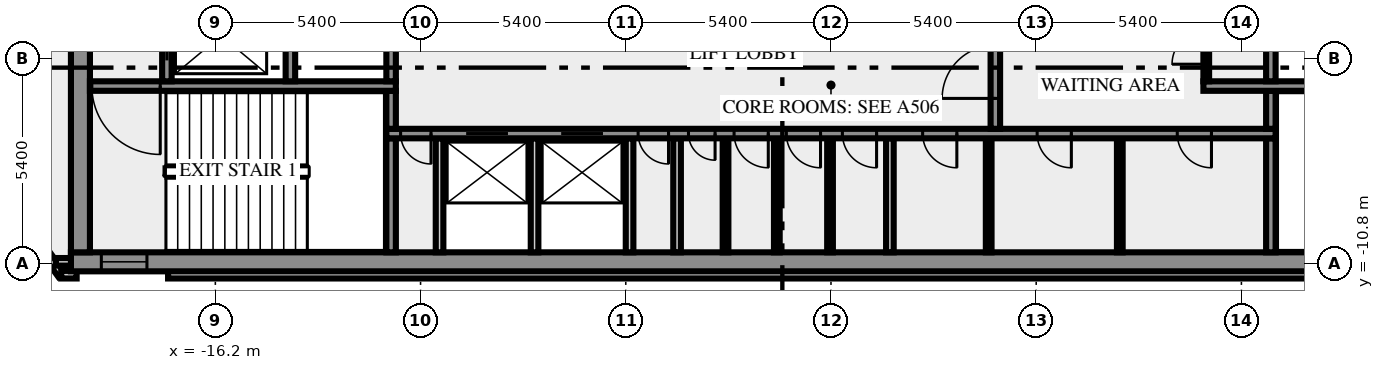
"""IFC4 building model, lengths in metres.
Left out: names, types, materials, properties, quantities, classifications, styles, units other than length and angle.
Written with IfcOpenShell. Run it as: python <this file> out.ifc"""

import sys

from ifc_helpers import new_model, si_unit, direction, frame, frame_2d, origin, place, context, subcontext, project, spatial, rectangle, extrude, element, fill, save


model = new_model("IFC4")
c1 = context("Model", 3, precision=1e-05, world=origin(), true_north=direction((0.0, 1.0)))
c2 = subcontext(c1, "Body", "Model", "MODEL_VIEW")
j1 = project(units=[si_unit("LENGTHUNIT", "METRE"), si_unit("PLANEANGLEUNIT", "RADIAN")], contexts=[c1])
p1 = place(None, origin())
s1 = spatial("IfcSite", under=j1, at=p1, CompositionType="ELEMENT")
p2 = place(p1, origin())
s2 = spatial("IfcBuilding", under=s1, at=p2, CompositionType="ELEMENT")
p3 = place(p2, frame((0.0, 0.0, 257.0)))
s3 = spatial("IfcBuildingStorey", under=s2, at=p3, CompositionType="ELEMENT", Elevation=257.0)
p4 = place(p3, frame((-21.833, -8.909, 0.0), z_axis=(0.0, 0.0, 1.0), x_axis=(0.587766567315, -0.809030569476, 0.0)))
e1 = element("IfcWall", 1, at=p4, inside=s3, PredefinedType="SOLIDWALL", context=c2, shape_type="SweptSolid", body=[
    extrude(rectangle(XDim=2.688, YDim=0.2, at=frame_2d((1.344, 0.0))), origin(), (0.0, 0.0, 1.0), 3.65),
])
p5 = place(p3, frame((-20.256, -11.088, 0.0), z_axis=(0.0, 0.0, 1.0), x_axis=(1.0, 0.0, 0.0)))
e2 = element("IfcWall", 2, at=p5, inside=s3, PredefinedType="SOLIDWALL", context=c2, shape_type="SweptSolid", body=[
    extrude(rectangle(XDim=0.406, YDim=0.2, at=frame_2d((0.203, 0.0))), origin(), (0.0, 0.0, 1.0), 3.65),
])
p6 = place(p3, frame((-17.444, -11.088, 0.0), z_axis=(0.0, 0.0, 1.0), x_axis=(1.0, 0.0, 0.0)))
e3 = element("IfcWall", 3, at=p6, inside=s3, PredefinedType="SOLIDWALL", context=c2, shape_type="SweptSolid", body=[
    extrude(rectangle(XDim=34.888, YDim=0.2, at=frame_2d((17.444, 0.0))), origin(), (0.0, 0.0, 1.0), 3.65),
])
p7 = place(p3, frame((-19.98, -10.75, 0.0), z_axis=(0.0, 0.0, 1.0), x_axis=(-1.0, 0.0, 0.0)))
e4 = element("IfcWall", 4, at=p7, inside=s3, PredefinedType="SOLIDWALL", context=c2, shape_type="SweptSolid", body=[
    extrude(rectangle(XDim=0.417, YDim=0.2, at=frame_2d((0.208, 0.0))), origin(), (0.0, 0.0, 1.0), 3.65),
])
p8 = place(p3, frame((-20.0, -10.75, 0.0), z_axis=(0.0, 0.0, 1.0), x_axis=(1.0, 0.0, 0.0)))
e5 = element("IfcWall", 5, at=p8, inside=s3, PredefinedType="SHEAR", context=c2, shape_type="SweptSolid", body=[
    extrude(rectangle(XDim=40.0, YDim=0.5, at=frame_2d((20.0, 0.0))), origin(), (0.0, 0.0, 1.0), 3.65),
])
p9 = place(p8, frame((0.8, 0.0, 1.0)))
e6 = element("IfcOpeningElement", 6, at=p9, cuts=e5, PredefinedType="OPENING", context=c2, shape_type="SweptSolid", body=[
    extrude(rectangle(XDim=1.2, YDim=1.2, at=frame_2d((0.6, 0.6))), frame((0.0, 0.26, 0.0), z_axis=(0.0, -1.0, 0.0), x_axis=(1.0, 0.0, 0.0)), (0.0, 0.0, 1.0), 0.52),
])
p10 = place(p8, frame((38.0, 0.0, 1.0)))
e7 = element("IfcOpeningElement", 7, at=p10, cuts=e5, PredefinedType="OPENING", context=c2, shape_type="SweptSolid", body=[
    extrude(rectangle(XDim=1.2, YDim=1.2, at=frame_2d((0.6, 0.6))), frame((0.0, 0.26, 0.0), z_axis=(0.0, -1.0, 0.0), x_axis=(1.0, 0.0, 0.0)), (0.0, 0.0, 1.0), 0.52),
])
p11 = place(p3, frame((-19.75, -10.5, 0.0), z_axis=(0.0, 0.0, 1.0), x_axis=(0.0, 1.0, 0.0)))
e8 = element("IfcWall", 8, at=p11, inside=s3, PredefinedType="SHEAR", context=c2, shape_type="SweptSolid", body=[
    extrude(rectangle(XDim=8.8, YDim=0.5, at=frame_2d((4.4, 0.0))), origin(), (0.0, 0.0, 1.0), 3.65),
])
p12 = place(p3, frame((-11.575, -10.5, 0.0), z_axis=(0.0, 0.0, 1.0), x_axis=(0.0, 1.0, 0.0)))
e9 = element("IfcWall", 9, at=p12, inside=s3, PredefinedType="SHEAR", context=c2, shape_type="SweptSolid", body=[
    extrude(rectangle(XDim=3.0, YDim=0.25, at=frame_2d((1.5, 0.0))), origin(), (0.0, 0.0, 1.0), 3.65),
])
for number, where, z_axis, x_axis in (
    (10, (-10.3, -10.5, 0.0), (0.0, 0.0, 1.0), (0.0, 1.0, 0.0)),
    (11, (-7.8, -10.5, 0.0), (0.0, 0.0, 1.0), (0.0, 1.0, 0.0)),
    (12, (-5.3, -10.5, 0.0), (0.0, 0.0, 1.0), (0.0, 1.0, 0.0)),
    (13, (-4.05, -10.5, 0.0), (0.0, 0.0, 1.0), (0.0, 1.0, 0.0)),
):
    element("IfcWall", number, at=place(p3, frame(where, z_axis=z_axis, x_axis=x_axis)), inside=s3, PredefinedType="SOLIDWALL", context=c2, shape_type="SweptSolid", body=[
        extrude(rectangle(XDim=3.0, YDim=0.2, at=frame_2d((1.5, 0.0))), origin(), (0.0, 0.0, 1.0), 3.65),
    ])
for number, where, z_axis, x_axis in (
    (14, (-2.775, -10.5, 0.0), (0.0, 0.0, 1.0), (0.0, 1.0, 0.0)),
    (15, (-1.425, -10.5, 0.0), (0.0, 0.0, 1.0), (0.0, 1.0, 0.0)),
    (16, (-0.025, -10.5, 0.0), (0.0, 0.0, 1.0), (0.0, 1.0, 0.0)),
):
    element("IfcWall", number, at=place(p3, frame(where, z_axis=z_axis, x_axis=x_axis)), inside=s3, PredefinedType="PARTITIONING", context=c2, shape_type="SweptSolid", body=[
        extrude(rectangle(XDim=3.0, YDim=0.15, at=frame_2d((1.5, 0.0))), origin(), (0.0, 0.0, 1.0), 3.65),
    ])
p13 = place(p3, frame((1.55, -10.5, 0.0), z_axis=(0.0, 0.0, 1.0), x_axis=(0.0, 1.0, 0.0)))
e17 = element("IfcWall", 17, at=p13, inside=s3, PredefinedType="SOLIDWALL", context=c2, shape_type="SweptSolid", body=[
    extrude(rectangle(XDim=3.0, YDim=0.2, at=frame_2d((1.5, 0.0))), origin(), (0.0, 0.0, 1.0), 3.65),
])
for number, where, z_axis, x_axis in (
    (18, (4.15, -10.5, 0.0), (0.0, 0.0, 1.0), (0.0, 1.0, 0.0)),
    (19, (7.6, -10.5, 0.0), (0.0, 0.0, 1.0), (0.0, 1.0, 0.0)),
):
    element("IfcWall", number, at=place(p3, frame(where, z_axis=z_axis, x_axis=x_axis)), inside=s3, PredefinedType="PARTITIONING", context=c2, shape_type="SweptSolid", body=[
        extrude(rectangle(XDim=3.0, YDim=0.15, at=frame_2d((1.5, 0.0))), origin(), (0.0, 0.0, 1.0), 3.65),
    ])
p14 = place(p3, frame((11.575, -10.5, 0.0), z_axis=(0.0, 0.0, 1.0), x_axis=(0.0, 1.0, 0.0)))
e20 = element("IfcWall", 20, at=p14, inside=s3, PredefinedType="SHEAR", context=c2, shape_type="SweptSolid", body=[
    extrude(rectangle(XDim=3.0, YDim=0.25, at=frame_2d((1.5, 0.0))), origin(), (0.0, 0.0, 1.0), 3.65),
])
p15 = place(p3, frame((11.7, -7.375, 0.0), z_axis=(0.0, 0.0, 1.0), x_axis=(-1.0, 0.0, 0.0)))
e21 = element("IfcWall", 21, at=p15, inside=s3, PredefinedType="SHEAR", context=c2, shape_type="SweptSolid", body=[
    extrude(rectangle(XDim=23.4, YDim=0.25, at=frame_2d((11.7, 0.0))), origin(), (0.0, 0.0, 1.0), 3.65),
])
p16 = place(p15, frame((22.225, 0.0, 0.0)))
e22 = element("IfcOpeningElement", 22, at=p16, cuts=e21, PredefinedType="OPENING", context=c2, shape_type="SweptSolid", body=[
    extrude(rectangle(XDim=0.8, YDim=2.1, at=frame_2d((0.4, 1.05))), frame((0.0, 0.135, 0.0), z_axis=(0.0, -1.0, 0.0), x_axis=(1.0, 0.0, 0.0)), (0.0, 0.0, 1.0), 0.27),
])
p17 = place(p15, frame((20.2, 0.0, 0.0)))
e23 = element("IfcOpeningElement", 23, at=p17, cuts=e21, PredefinedType="OPENING", context=c2, shape_type="SweptSolid", body=[
    extrude(rectangle(XDim=1.1, YDim=2.1, at=frame_2d((0.55, 1.05))), frame((0.0, 0.135, 0.0), z_axis=(0.0, -1.0, 0.0), x_axis=(1.0, 0.0, 0.0)), (0.0, 0.0, 1.0), 0.27),
])
p18 = place(p15, frame((17.7, 0.0, 0.0)))
e24 = element("IfcOpeningElement", 24, at=p18, cuts=e21, PredefinedType="OPENING", context=c2, shape_type="SweptSolid", body=[
    extrude(rectangle(XDim=1.1, YDim=2.1, at=frame_2d((0.55, 1.05))), frame((0.0, 0.135, 0.0), z_axis=(0.0, -1.0, 0.0), x_axis=(1.0, 0.0, 0.0)), (0.0, 0.0, 1.0), 0.27),
])
p19 = place(p15, frame((15.975, 0.0, 0.0)))
e25 = element("IfcOpeningElement", 25, at=p19, cuts=e21, PredefinedType="OPENING", context=c2, shape_type="SweptSolid", body=[
    extrude(rectangle(XDim=0.8, YDim=2.1, at=frame_2d((0.4, 1.05))), frame((0.0, 0.135, 0.0), z_axis=(0.0, -1.0, 0.0), x_axis=(1.0, 0.0, 0.0)), (0.0, 0.0, 1.0), 0.27),
])
p20 = place(p15, frame((14.75, 0.0, 0.0)))
e26 = element("IfcOpeningElement", 26, at=p20, cuts=e21, PredefinedType="OPENING", context=c2, shape_type="SweptSolid", body=[
    extrude(rectangle(XDim=0.7, YDim=2.1, at=frame_2d((0.35, 1.05))), frame((0.0, 0.135, 0.0), z_axis=(0.0, -1.0, 0.0), x_axis=(1.0, 0.0, 0.0)), (0.0, 0.0, 1.0), 0.27),
])
p21 = place(p15, frame((13.35, 0.0, 0.0)))
e27 = element("IfcOpeningElement", 27, at=p21, cuts=e21, PredefinedType="OPENING", context=c2, shape_type="SweptSolid", body=[
    extrude(rectangle(XDim=0.9, YDim=2.1, at=frame_2d((0.45, 1.05))), frame((0.0, 0.135, 0.0), z_axis=(0.0, -1.0, 0.0), x_axis=(1.0, 0.0, 0.0)), (0.0, 0.0, 1.0), 0.27),
])
p22 = place(p15, frame((11.975, 0.0, 0.0)))
e28 = element("IfcOpeningElement", 28, at=p22, cuts=e21, PredefinedType="OPENING", context=c2, shape_type="SweptSolid", body=[
    extrude(rectangle(XDim=0.9, YDim=2.1, at=frame_2d((0.45, 1.05))), frame((0.0, 0.135, 0.0), z_axis=(0.0, -1.0, 0.0), x_axis=(1.0, 0.0, 0.0)), (0.0, 0.0, 1.0), 0.27),
])
p23 = place(p15, frame((10.5, 0.0, 0.0)))
e29 = element("IfcOpeningElement", 29, at=p23, cuts=e21, PredefinedType="OPENING", context=c2, shape_type="SweptSolid", body=[
    extrude(rectangle(XDim=0.9, YDim=2.1, at=frame_2d((0.45, 1.05))), frame((0.0, 0.135, 0.0), z_axis=(0.0, -1.0, 0.0), x_axis=(1.0, 0.0, 0.0)), (0.0, 0.0, 1.0), 0.27),
])
p24 = place(p15, frame((8.388, 0.0, 0.0)))
e30 = element("IfcOpeningElement", 30, at=p24, cuts=e21, PredefinedType="OPENING", context=c2, shape_type="SweptSolid", body=[
    extrude(rectangle(XDim=0.9, YDim=2.1, at=frame_2d((0.45, 1.05))), frame((0.0, 0.135, 0.0), z_axis=(0.0, -1.0, 0.0), x_axis=(1.0, 0.0, 0.0)), (0.0, 0.0, 1.0), 0.27),
])
p25 = place(p15, frame((5.375, 0.0, 0.0)))
e31 = element("IfcOpeningElement", 31, at=p25, cuts=e21, PredefinedType="OPENING", context=c2, shape_type="SweptSolid", body=[
    extrude(rectangle(XDim=0.9, YDim=2.1, at=frame_2d((0.45, 1.05))), frame((0.0, 0.135, 0.0), z_axis=(0.0, -1.0, 0.0), x_axis=(1.0, 0.0, 0.0)), (0.0, 0.0, 1.0), 0.27),
])
p26 = place(p15, frame((1.688, 0.0, 0.0)))
e32 = element("IfcOpeningElement", 32, at=p26, cuts=e21, PredefinedType="OPENING", context=c2, shape_type="SweptSolid", body=[
    extrude(rectangle(XDim=0.9, YDim=2.1, at=frame_2d((0.45, 1.05))), frame((0.0, 0.135, 0.0), z_axis=(0.0, -1.0, 0.0), x_axis=(1.0, 0.0, 0.0)), (0.0, 0.0, 1.0), 0.27),
])
p27 = place(p3, frame((-11.575, -7.25, 0.0), z_axis=(0.0, 0.0, 1.0), x_axis=(0.0, 1.0, 0.0)))
e33 = element("IfcWall", 33, at=p27, inside=s3, PredefinedType="SHEAR", context=c2, shape_type="SweptSolid", body=[
    extrude(rectangle(XDim=1.0, YDim=0.25, at=frame_2d((0.5, 0.0))), origin(), (0.0, 0.0, 1.0), 3.65),
])
p28 = place(p3, frame((4.325, -7.25, 0.0), z_axis=(0.0, 0.0, 1.0), x_axis=(0.0, 1.0, 0.0)))
e34 = element("IfcWall", 34, at=p28, inside=s3, PredefinedType="SHEAR", context=c2, shape_type="SweptSolid", body=[
    extrude(rectangle(XDim=3.0, YDim=0.25, at=frame_2d((1.5, 0.0))), origin(), (0.0, 0.0, 1.0), 3.65),
])
p29 = place(p28, frame((0.8, 0.0, 0.0)))
e35 = element("IfcOpeningElement", 35, at=p29, cuts=e34, PredefinedType="OPENING", context=c2, shape_type="SweptSolid", body=[
    extrude(rectangle(XDim=1.4, YDim=2.1, at=frame_2d((0.7, 1.05))), frame((0.0, 0.135, 0.0), z_axis=(0.0, -1.0, 0.0), x_axis=(1.0, 0.0, 0.0)), (0.0, 0.0, 1.0), 0.27),
])
p30 = place(p3, frame((11.575, -7.25, 0.0), z_axis=(0.0, 0.0, 1.0), x_axis=(0.0, 1.0, 0.0)))
e36 = element("IfcWall", 36, at=p30, inside=s3, PredefinedType="SHEAR", context=c2, shape_type="SweptSolid", body=[
    extrude(rectangle(XDim=1.0, YDim=0.25, at=frame_2d((0.5, 0.0))), origin(), (0.0, 0.0, 1.0), 3.65),
])
p31 = place(p3, frame((-11.45, -6.125, 0.0), z_axis=(0.0, 0.0, 1.0), x_axis=(-1.0, 0.0, 0.0)))
e37 = element("IfcWall", 37, at=p31, inside=s3, PredefinedType="SHEAR", context=c2, shape_type="SweptSolid", body=[
    extrude(rectangle(XDim=8.05, YDim=0.25, at=frame_2d((4.025, 0.0))), origin(), (0.0, 0.0, 1.0), 3.65),
])
p32 = place(p31, frame((6.2, 0.0, 0.0)))
e38 = element("IfcOpeningElement", 38, at=p32, cuts=e37, PredefinedType="OPENING", context=c2, shape_type="SweptSolid", body=[
    extrude(rectangle(XDim=1.8, YDim=2.1, at=frame_2d((0.9, 1.05))), frame((0.0, 0.135, 0.0), z_axis=(0.0, -1.0, 0.0), x_axis=(1.0, 0.0, 0.0)), (0.0, 0.0, 1.0), 0.27),
])
p33 = place(p3, frame((20.0, -6.125, 0.0), z_axis=(0.0, 0.0, 1.0), x_axis=(-1.0, 0.0, 0.0)))
e39 = element("IfcWall", 39, at=p33, inside=s3, PredefinedType="SHEAR", context=c2, shape_type="SweptSolid", body=[
    extrude(rectangle(XDim=10.2, YDim=0.25, at=frame_2d((5.1, 0.0))), origin(), (0.0, 0.0, 1.0), 3.65),
])
p34 = place(p33, frame((0.55, 0.0, 0.0)))
e40 = element("IfcOpeningElement", 40, at=p34, cuts=e39, PredefinedType="OPENING", context=c2, shape_type="SweptSolid", body=[
    extrude(rectangle(XDim=1.8, YDim=2.1, at=frame_2d((0.9, 1.05))), frame((0.0, 0.135, 0.0), z_axis=(0.0, -1.0, 0.0), x_axis=(1.0, 0.0, 0.0)), (0.0, 0.0, 1.0), 0.27),
])
p35 = place(p3, frame((-17.475, -6.0, 0.0), z_axis=(0.0, 0.0, 1.0), x_axis=(0.0, 1.0, 0.0)))
e41 = element("IfcWall", 41, at=p35, inside=s3, PredefinedType="SHEAR", context=c2, shape_type="SweptSolid", body=[
    extrude(rectangle(XDim=4.3, YDim=0.25, at=frame_2d((2.15, 0.0))), origin(), (0.0, 0.0, 1.0), 3.65),
])
p36 = place(p35, frame((0.55, 0.0, 0.0)))
e42 = element("IfcOpeningElement", 42, at=p36, cuts=e41, PredefinedType="OPENING", context=c2, shape_type="SweptSolid", body=[
    extrude(rectangle(XDim=1.3, YDim=2.1, at=frame_2d((0.65, 1.05))), frame((0.0, 0.135, 0.0), z_axis=(0.0, -1.0, 0.0), x_axis=(1.0, 0.0, 0.0)), (0.0, 0.0, 1.0), 0.27),
])
for number, where, z_axis, x_axis in (
    (43, (-14.225, -6.0, 0.0), (0.0, 0.0, 1.0), (0.0, 1.0, 0.0)),
    (44, (-11.575, -6.0, 0.0), (0.0, 0.0, 1.0), (0.0, 1.0, 0.0)),
):
    element("IfcWall", number, at=place(p3, frame(where, z_axis=z_axis, x_axis=x_axis)), inside=s3, PredefinedType="SHEAR", context=c2, shape_type="SweptSolid", body=[
        extrude(rectangle(XDim=1.75, YDim=0.25, at=frame_2d((0.875, 0.0))), origin(), (0.0, 0.0, 1.0), 3.65),
    ])
p37 = place(p3, frame((9.875, -6.0, 0.0), z_axis=(0.0, 0.0, 1.0), x_axis=(0.0, 1.0, 0.0)))
e45 = element("IfcWall", 45, at=p37, inside=s3, PredefinedType="PARTITIONING", context=c2, shape_type="SweptSolid", body=[
    extrude(rectangle(XDim=1.75, YDim=0.15, at=frame_2d((0.875, 0.0))), origin(), (0.0, 0.0, 1.0), 3.65),
])
p38 = place(p37, frame((0.45, 0.0, 0.0)))
e46 = element("IfcOpeningElement", 46, at=p38, cuts=e45, PredefinedType="OPENING", context=c2, shape_type="SweptSolid", body=[
    extrude(rectangle(XDim=0.9, YDim=2.1, at=frame_2d((0.45, 1.05))), frame((0.0, 0.085, 0.0), z_axis=(0.0, -1.0, 0.0), x_axis=(1.0, 0.0, 0.0)), (0.0, 0.0, 1.0), 0.17),
])
p39 = place(p3, frame((11.575, -6.0, 0.0), z_axis=(0.0, 0.0, 1.0), x_axis=(0.0, 1.0, 0.0)))
e47 = element("IfcWall", 47, at=p39, inside=s3, PredefinedType="SHEAR", context=c2, shape_type="SweptSolid", body=[
    extrude(rectangle(XDim=1.75, YDim=0.25, at=frame_2d((0.875, 0.0))), origin(), (0.0, 0.0, 1.0), 3.65),
])
p40 = place(p9, origin())
e48 = element("IfcWindow", 48, at=p40, inside=s3, PartitioningType="SINGLE_PANEL", PredefinedType="WINDOW", context=c2, shape_type="SweptSolid", body=[
    extrude(rectangle(XDim=1.2, YDim=1.2, at=frame_2d((0.6, 0.6))), frame((0.0, 0.03, 0.0), z_axis=(0.0, -1.0, 0.0), x_axis=(1.0, 0.0, 0.0)), (0.0, 0.0, 1.0), 0.06),
])
fill(e6, e48)
p41 = place(p16, origin())
e49 = element("IfcDoor", 49, at=p41, inside=s3, OperationType="SINGLE_SWING_RIGHT", PredefinedType="DOOR", context=c2, shape_type="SweptSolid", body=[
    extrude(rectangle(XDim=0.8, YDim=2.1, at=frame_2d((0.4, 1.05))), frame((0.0, 0.025, 0.0), z_axis=(0.0, -1.0, 0.0), x_axis=(1.0, 0.0, 0.0)), (0.0, 0.0, 1.0), 0.05),
])
fill(e22, e49)
p42 = place(p17, origin())
e50 = element("IfcDoor", 50, at=p42, inside=s3, OperationType="DOUBLE_DOOR_SLIDING", PredefinedType="DOOR", context=c2, shape_type="SweptSolid", body=[
    extrude(rectangle(XDim=1.1, YDim=2.1, at=frame_2d((0.55, 1.05))), frame((0.0, 0.025, 0.0), z_axis=(0.0, -1.0, 0.0), x_axis=(1.0, 0.0, 0.0)), (0.0, 0.0, 1.0), 0.05),
])
fill(e23, e50)
p43 = place(p18, origin())
e51 = element("IfcDoor", 51, at=p43, inside=s3, OperationType="DOUBLE_DOOR_SLIDING", PredefinedType="DOOR", context=c2, shape_type="SweptSolid", body=[
    extrude(rectangle(XDim=1.1, YDim=2.1, at=frame_2d((0.55, 1.05))), frame((0.0, 0.025, 0.0), z_axis=(0.0, -1.0, 0.0), x_axis=(1.0, 0.0, 0.0)), (0.0, 0.0, 1.0), 0.05),
])
fill(e24, e51)
p44 = place(p19, origin())
e52 = element("IfcDoor", 52, at=p44, inside=s3, OperationType="SINGLE_SWING_RIGHT", PredefinedType="DOOR", context=c2, shape_type="SweptSolid", body=[
    extrude(rectangle(XDim=0.8, YDim=2.1, at=frame_2d((0.4, 1.05))), frame((0.0, 0.025, 0.0), z_axis=(0.0, -1.0, 0.0), x_axis=(1.0, 0.0, 0.0)), (0.0, 0.0, 1.0), 0.05),
])
fill(e25, e52)
p45 = place(p20, origin())
e53 = element("IfcDoor", 53, at=p45, inside=s3, OperationType="SINGLE_SWING_RIGHT", PredefinedType="DOOR", context=c2, shape_type="SweptSolid", body=[
    extrude(rectangle(XDim=0.7, YDim=2.1, at=frame_2d((0.35, 1.05))), frame((0.0, 0.025, 0.0), z_axis=(0.0, -1.0, 0.0), x_axis=(1.0, 0.0, 0.0)), (0.0, 0.0, 1.0), 0.05),
])
fill(e26, e53)
p46 = place(p21, origin())
e54 = element("IfcDoor", 54, at=p46, inside=s3, OperationType="SINGLE_SWING_RIGHT", PredefinedType="DOOR", context=c2, shape_type="SweptSolid", body=[
    extrude(rectangle(XDim=0.9, YDim=2.1, at=frame_2d((0.45, 1.05))), frame((0.0, 0.025, 0.0), z_axis=(0.0, -1.0, 0.0), x_axis=(1.0, 0.0, 0.0)), (0.0, 0.0, 1.0), 0.05),
])
fill(e27, e54)
p47 = place(p22, origin())
e55 = element("IfcDoor", 55, at=p47, inside=s3, OperationType="SINGLE_SWING_RIGHT", PredefinedType="DOOR", context=c2, shape_type="SweptSolid", body=[
    extrude(rectangle(XDim=0.9, YDim=2.1, at=frame_2d((0.45, 1.05))), frame((0.0, 0.025, 0.0), z_axis=(0.0, -1.0, 0.0), x_axis=(1.0, 0.0, 0.0)), (0.0, 0.0, 1.0), 0.05),
])
fill(e28, e55)
p48 = place(p23, origin())
e56 = element("IfcDoor", 56, at=p48, inside=s3, OperationType="SINGLE_SWING_LEFT", PredefinedType="DOOR", context=c2, shape_type="SweptSolid", body=[
    extrude(rectangle(XDim=0.9, YDim=2.1, at=frame_2d((0.45, 1.05))), frame((0.0, 0.025, 0.0), z_axis=(0.0, -1.0, 0.0), x_axis=(1.0, 0.0, 0.0)), (0.0, 0.0, 1.0), 0.05),
])
fill(e29, e56)
p49 = place(p24, origin())
e57 = element("IfcDoor", 57, at=p49, inside=s3, OperationType="SINGLE_SWING_LEFT", PredefinedType="DOOR", context=c2, shape_type="SweptSolid", body=[
    extrude(rectangle(XDim=0.9, YDim=2.1, at=frame_2d((0.45, 1.05))), frame((0.0, 0.025, 0.0), z_axis=(0.0, -1.0, 0.0), x_axis=(1.0, 0.0, 0.0)), (0.0, 0.0, 1.0), 0.05),
])
fill(e30, e57)
p50 = place(p25, origin())
e58 = element("IfcDoor", 58, at=p50, inside=s3, OperationType="SINGLE_SWING_LEFT", PredefinedType="DOOR", context=c2, shape_type="SweptSolid", body=[
    extrude(rectangle(XDim=0.9, YDim=2.1, at=frame_2d((0.45, 1.05))), frame((0.0, 0.025, 0.0), z_axis=(0.0, -1.0, 0.0), x_axis=(1.0, 0.0, 0.0)), (0.0, 0.0, 1.0), 0.05),
])
fill(e31, e58)
p51 = place(p26, origin())
e59 = element("IfcDoor", 59, at=p51, inside=s3, OperationType="SINGLE_SWING_LEFT", PredefinedType="DOOR", context=c2, shape_type="SweptSolid", body=[
    extrude(rectangle(XDim=0.9, YDim=2.1, at=frame_2d((0.45, 1.05))), frame((0.0, 0.025, 0.0), z_axis=(0.0, -1.0, 0.0), x_axis=(1.0, 0.0, 0.0)), (0.0, 0.0, 1.0), 0.05),
])
fill(e32, e59)
p52 = place(p29, origin())
e60 = element("IfcDoor", 60, at=p52, inside=s3, OperationType="DOUBLE_DOOR_SINGLE_SWING", PredefinedType="DOOR", context=c2, shape_type="SweptSolid", body=[
    extrude(rectangle(XDim=1.4, YDim=2.1, at=frame_2d((0.7, 1.05))), frame((0.0, 0.025, 0.0), z_axis=(0.0, -1.0, 0.0), x_axis=(1.0, 0.0, 0.0)), (0.0, 0.0, 1.0), 0.05),
])
fill(e35, e60)
p53 = place(p32, origin())
e61 = element("IfcDoor", 61, at=p53, inside=s3, OperationType="DOUBLE_DOOR_SINGLE_SWING", PredefinedType="DOOR", context=c2, shape_type="SweptSolid", body=[
    extrude(rectangle(XDim=1.8, YDim=2.1, at=frame_2d((0.9, 1.05))), frame((0.0, 0.025, 0.0), z_axis=(0.0, -1.0, 0.0), x_axis=(1.0, 0.0, 0.0)), (0.0, 0.0, 1.0), 0.05),
])
fill(e38, e61)
p54 = place(p36, origin())
e62 = element("IfcDoor", 62, at=p54, inside=s3, OperationType="DOUBLE_DOOR_SLIDING", PredefinedType="DOOR", context=c2, shape_type="SweptSolid", body=[
    extrude(rectangle(XDim=1.3, YDim=2.1, at=frame_2d((0.65, 1.05))), frame((0.0, 0.025, 0.0), z_axis=(0.0, -1.0, 0.0), x_axis=(1.0, 0.0, 0.0)), (0.0, 0.0, 1.0), 0.05),
])
fill(e42, e62)
p55 = place(p38, origin())
e63 = element("IfcDoor", 63, at=p55, inside=s3, OperationType="SINGLE_SWING_RIGHT", PredefinedType="DOOR", context=c2, shape_type="SweptSolid", body=[
    extrude(rectangle(XDim=0.9, YDim=2.1, at=frame_2d((0.45, 1.05))), frame((0.0, 0.025, 0.0), z_axis=(0.0, -1.0, 0.0), x_axis=(1.0, 0.0, 0.0)), (0.0, 0.0, 1.0), 0.05),
])
fill(e46, e63)
save(model, sys.argv[1])
